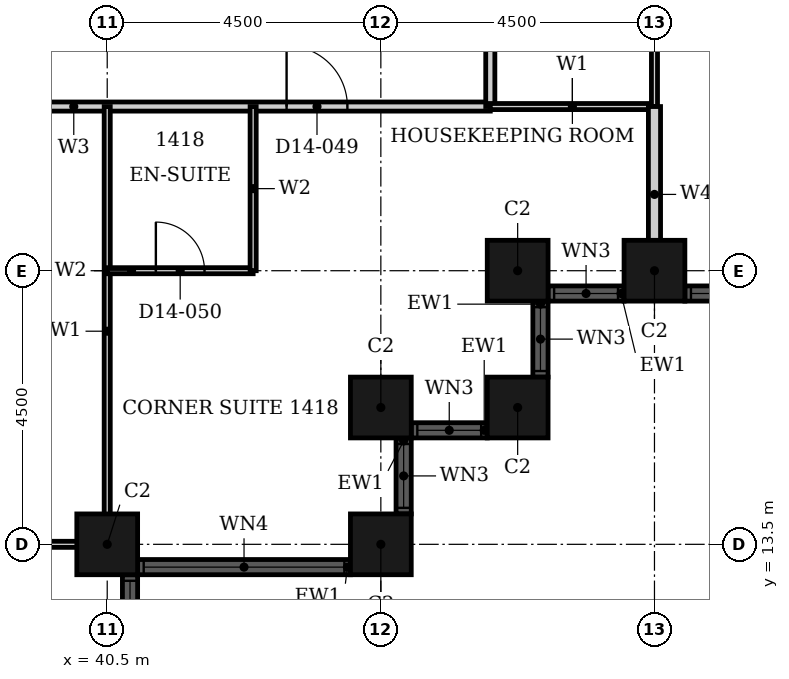
"""IFC4 building model, lengths in metres.
Left out: names, types, materials, properties, quantities, classifications, styles, units other than length and angle.
Written with IfcOpenShell. Run it as: python <this file> out.ifc"""

import sys

from ifc_helpers import new_model, si_unit, direction, frame, frame_2d, origin, origin_2d, place, context, subcontext, project, spatial, rectangle, hollow_rectangle, extrude, element, fill, save


model = new_model("IFC4")
c1 = context("Model", 3, precision=1e-05, world=origin(), true_north=direction((0.0, 1.0)))
c2 = subcontext(c1, "Body", "Model", "MODEL_VIEW")
j1 = project(units=[si_unit("LENGTHUNIT", "METRE"), si_unit("PLANEANGLEUNIT", "RADIAN")], contexts=[c1])
p1 = place(None, origin())
s1 = spatial("IfcSite", under=j1, at=p1, CompositionType="ELEMENT")
p2 = place(p1, origin())
s2 = spatial("IfcBuilding", under=s1, at=p2, CompositionType="ELEMENT")
p3 = place(p2, frame((0.0, 0.0, 63.6)))
s3 = spatial("IfcBuildingStorey", under=s2, at=p3, CompositionType="ELEMENT", Elevation=63.6)
for number, where, z_axis, x_axis in (
    (1, (40.5, 13.5, 0.0), (0.0, 0.0, 1.0), (1.0, 0.0, 0.0)),
    (2, (45.0, 13.5, 0.0), (0.0, 0.0, 1.0), (1.0, 0.0, 0.0)),
    (3, (45.0, 15.75, 0.0), (0.0, 0.0, 1.0), (1.0, 0.0, 0.0)),
    (4, (47.25, 15.75, 0.0), (0.0, 0.0, 1.0), (1.0, 0.0, 0.0)),
    (5, (47.25, 18.0, 0.0), (0.0, 0.0, 1.0), (1.0, 0.0, 0.0)),
    (6, (49.5, 18.0, 0.0), (0.0, 0.0, 1.0), (1.0, 0.0, 0.0)),
):
    element("IfcColumn", number, at=place(p3, frame(where, z_axis=z_axis, x_axis=x_axis)), inside=s3, PredefinedType="COLUMN", context=c2, shape_type="SweptSolid", body=[
        extrude(hollow_rectangle(XDim=1.0, YDim=1.0, WallThickness=0.032, at=origin_2d()), origin(), (0.0, 0.0, 1.0), 3.6),
    ])
p4 = place(p3, frame((40.875, 5.0, 0.0), z_axis=(0.0, 0.0, 1.0), x_axis=(0.0, 1.0, 0.0)))
e7 = element("IfcWall", 7, at=p4, inside=s3, PredefinedType="SOLIDWALL", context=c2, shape_type="SweptSolid", body=[
    extrude(rectangle(XDim=8.0, YDim=0.25, at=frame_2d((4.0, 0.0))), origin(), (0.0, 0.0, 1.0), 3.6),
])
p5 = place(p4, frame((0.1, 0.0, 0.9)))
e8 = element("IfcOpeningElement", 8, at=p5, cuts=e7, PredefinedType="OPENING", context=c2, shape_type="SweptSolid", body=[
    extrude(rectangle(XDim=3.3, YDim=2.08, at=frame_2d((1.65, 1.04))), frame((0.0, 0.135, 0.0), z_axis=(0.0, -1.0, 0.0), x_axis=(1.0, 0.0, 0.0)), (0.0, 0.0, 1.0), 0.27),
])
p6 = place(p4, frame((4.6, 0.0, 0.9)))
e9 = element("IfcOpeningElement", 9, at=p6, cuts=e7, PredefinedType="OPENING", context=c2, shape_type="SweptSolid", body=[
    extrude(rectangle(XDim=3.3, YDim=2.08, at=frame_2d((1.65, 1.04))), frame((0.0, 0.135, 0.0), z_axis=(0.0, -1.0, 0.0), x_axis=(1.0, 0.0, 0.0)), (0.0, 0.0, 1.0), 0.27),
])
p7 = place(p3, frame((41.0, 13.125, 0.0), z_axis=(0.0, 0.0, 1.0), x_axis=(1.0, 0.0, 0.0)))
e10 = element("IfcWall", 10, at=p7, inside=s3, PredefinedType="SOLIDWALL", context=c2, shape_type="SweptSolid", body=[
    extrude(rectangle(XDim=3.5, YDim=0.25, at=frame_2d((1.75, 0.0))), origin(), (0.0, 0.0, 1.0), 3.6),
])
p8 = place(p7, frame((0.1, 0.0, 0.9)))
e11 = element("IfcOpeningElement", 11, at=p8, cuts=e10, PredefinedType="OPENING", context=c2, shape_type="SweptSolid", body=[
    extrude(rectangle(XDim=3.3, YDim=2.08, at=frame_2d((1.65, 1.04))), frame((0.0, 0.135, 0.0), z_axis=(0.0, -1.0, 0.0), x_axis=(1.0, 0.0, 0.0)), (0.0, 0.0, 1.0), 0.27),
])
p9 = place(p3, frame((45.375, 14.0, 0.0), z_axis=(0.0, 0.0, 1.0), x_axis=(0.0, 1.0, 0.0)))
e12 = element("IfcWall", 12, at=p9, inside=s3, PredefinedType="SOLIDWALL", context=c2, shape_type="SweptSolid", body=[
    extrude(rectangle(XDim=1.25, YDim=0.25, at=frame_2d((0.625, 0.0))), origin(), (0.0, 0.0, 1.0), 3.6),
])
p10 = place(p9, frame((0.1, 0.0, 0.9)))
e13 = element("IfcOpeningElement", 13, at=p10, cuts=e12, PredefinedType="OPENING", context=c2, shape_type="SweptSolid", body=[
    extrude(rectangle(XDim=1.05, YDim=2.08, at=frame_2d((0.525, 1.04))), frame((0.0, 0.135, 0.0), z_axis=(0.0, -1.0, 0.0), x_axis=(1.0, 0.0, 0.0)), (0.0, 0.0, 1.0), 0.27),
])
p11 = place(p3, frame((45.5, 15.375, 0.0), z_axis=(0.0, 0.0, 1.0), x_axis=(1.0, 0.0, 0.0)))
e14 = element("IfcWall", 14, at=p11, inside=s3, PredefinedType="SOLIDWALL", context=c2, shape_type="SweptSolid", body=[
    extrude(rectangle(XDim=1.25, YDim=0.25, at=frame_2d((0.625, 0.0))), origin(), (0.0, 0.0, 1.0), 3.6),
])
p12 = place(p11, frame((0.1, 0.0, 0.9)))
e15 = element("IfcOpeningElement", 15, at=p12, cuts=e14, PredefinedType="OPENING", context=c2, shape_type="SweptSolid", body=[
    extrude(rectangle(XDim=1.05, YDim=2.08, at=frame_2d((0.525, 1.04))), frame((0.0, 0.135, 0.0), z_axis=(0.0, -1.0, 0.0), x_axis=(1.0, 0.0, 0.0)), (0.0, 0.0, 1.0), 0.27),
])
p13 = place(p3, frame((47.625, 16.25, 0.0), z_axis=(0.0, 0.0, 1.0), x_axis=(0.0, 1.0, 0.0)))
e16 = element("IfcWall", 16, at=p13, inside=s3, PredefinedType="SOLIDWALL", context=c2, shape_type="SweptSolid", body=[
    extrude(rectangle(XDim=1.25, YDim=0.25, at=frame_2d((0.625, 0.0))), origin(), (0.0, 0.0, 1.0), 3.6),
])
p14 = place(p13, frame((0.1, 0.0, 0.9)))
e17 = element("IfcOpeningElement", 17, at=p14, cuts=e16, PredefinedType="OPENING", context=c2, shape_type="SweptSolid", body=[
    extrude(rectangle(XDim=1.05, YDim=2.08, at=frame_2d((0.525, 1.04))), frame((0.0, 0.135, 0.0), z_axis=(0.0, -1.0, 0.0), x_axis=(1.0, 0.0, 0.0)), (0.0, 0.0, 1.0), 0.27),
])
p15 = place(p3, frame((47.75, 17.625, 0.0), z_axis=(0.0, 0.0, 1.0), x_axis=(1.0, 0.0, 0.0)))
e18 = element("IfcWall", 18, at=p15, inside=s3, PredefinedType="SOLIDWALL", context=c2, shape_type="SweptSolid", body=[
    extrude(rectangle(XDim=1.25, YDim=0.25, at=frame_2d((0.625, 0.0))), origin(), (0.0, 0.0, 1.0), 3.6),
])
p16 = place(p15, frame((0.1, 0.0, 0.9)))
e19 = element("IfcOpeningElement", 19, at=p16, cuts=e18, PredefinedType="OPENING", context=c2, shape_type="SweptSolid", body=[
    extrude(rectangle(XDim=1.05, YDim=2.08, at=frame_2d((0.525, 1.04))), frame((0.0, 0.135, 0.0), z_axis=(0.0, -1.0, 0.0), x_axis=(1.0, 0.0, 0.0)), (0.0, 0.0, 1.0), 0.27),
])
p17 = place(p3, frame((50.0, 17.625, 0.0), z_axis=(0.0, 0.0, 1.0), x_axis=(1.0, 0.0, 0.0)))
e20 = element("IfcWall", 20, at=p17, inside=s3, PredefinedType="SOLIDWALL", context=c2, shape_type="SweptSolid", body=[
    extrude(rectangle(XDim=8.0, YDim=0.25, at=frame_2d((4.0, 0.0))), origin(), (0.0, 0.0, 1.0), 3.6),
])
p18 = place(p17, frame((0.1, 0.0, 0.9)))
e21 = element("IfcOpeningElement", 21, at=p18, cuts=e20, PredefinedType="OPENING", context=c2, shape_type="SweptSolid", body=[
    extrude(rectangle(XDim=3.3, YDim=2.08, at=frame_2d((1.65, 1.04))), frame((0.0, 0.135, 0.0), z_axis=(0.0, -1.0, 0.0), x_axis=(1.0, 0.0, 0.0)), (0.0, 0.0, 1.0), 0.27),
])
p19 = place(p17, frame((4.6, 0.0, 0.9)))
e22 = element("IfcOpeningElement", 22, at=p19, cuts=e20, PredefinedType="OPENING", context=c2, shape_type="SweptSolid", body=[
    extrude(rectangle(XDim=3.3, YDim=2.08, at=frame_2d((1.65, 1.04))), frame((0.0, 0.135, 0.0), z_axis=(0.0, -1.0, 0.0), x_axis=(1.0, 0.0, 0.0)), (0.0, 0.0, 1.0), 0.27),
])
p20 = place(p3, frame((31.5, 20.7, 0.0), z_axis=(0.0, 0.0, 1.0), x_axis=(1.0, 0.0, 0.0)))
e23 = element("IfcWall", 23, at=p20, inside=s3, PredefinedType="PARTITIONING", context=c2, shape_type="SweptSolid", body=[
    extrude(rectangle(XDim=15.3, YDim=0.15, at=frame_2d((7.65, 0.0))), origin(), (0.0, 0.0, 1.0), 3.3),
])
p21 = place(p20, frame((11.95, 0.0, 0.0)))
e24 = element("IfcOpeningElement", 24, at=p21, cuts=e23, PredefinedType="OPENING", context=c2, shape_type="SweptSolid", body=[
    extrude(rectangle(XDim=1.0, YDim=2.1, at=frame_2d((0.5, 1.05))), frame((0.0, 0.085, 0.0), z_axis=(0.0, -1.0, 0.0), x_axis=(1.0, 0.0, 0.0)), (0.0, 0.0, 1.0), 0.17),
])
p22 = place(p20, frame((4.05, 0.0, 0.0)))
e25 = element("IfcOpeningElement", 25, at=p22, cuts=e23, PredefinedType="OPENING", context=c2, shape_type="SweptSolid", body=[
    extrude(rectangle(XDim=0.9, YDim=2.1, at=frame_2d((0.45, 1.05))), frame((0.0, 0.085, 0.0), z_axis=(0.0, -1.0, 0.0), x_axis=(1.0, 0.0, 0.0)), (0.0, 0.0, 1.0), 0.17),
])
p23 = place(p3, frame((46.8, 20.7, 0.0), z_axis=(0.0, 0.0, 1.0), x_axis=(0.0, 1.0, 0.0)))
e26 = element("IfcWall", 26, at=p23, inside=s3, PredefinedType="PARTITIONING", context=c2, shape_type="SweptSolid", body=[
    extrude(rectangle(XDim=6.3, YDim=0.15, at=frame_2d((3.15, 0.0))), origin(), (0.0, 0.0, 1.0), 3.3),
])
p24 = place(p23, frame((2.65, 0.0, 0.0)))
e27 = element("IfcOpeningElement", 27, at=p24, cuts=e26, PredefinedType="OPENING", context=c2, shape_type="SweptSolid", body=[
    extrude(rectangle(XDim=0.9, YDim=2.1, at=frame_2d((0.45, 1.05))), frame((0.0, 0.085, 0.0), z_axis=(0.0, -1.0, 0.0), x_axis=(1.0, 0.0, 0.0)), (0.0, 0.0, 1.0), 0.17),
])
p25 = place(p3, frame((31.5, 13.5, 0.0), z_axis=(0.0, 0.0, 1.0), x_axis=(1.0, 0.0, 0.0)))
e28 = element("IfcWall", 28, at=p25, inside=s3, PredefinedType="PARTITIONING", context=c2, shape_type="SweptSolid", body=[
    extrude(rectangle(XDim=9.19, YDim=0.1, at=frame_2d((4.595, 0.0))), origin(), (0.0, 0.0, 1.0), 2.38),
])
p26 = place(p3, frame((46.8, 20.7, 0.0), z_axis=(0.0, 0.0, 1.0), x_axis=(1.0, 0.0, 0.0)))
e29 = element("IfcWall", 29, at=p26, inside=s3, PredefinedType="PARTITIONING", context=c2, shape_type="SweptSolid", body=[
    extrude(rectangle(XDim=2.7, YDim=0.1, at=frame_2d((1.35, 0.0))), origin(), (0.0, 0.0, 1.0), 3.3),
])
p27 = place(p3, frame((40.5, 13.31, 0.0), z_axis=(0.0, 0.0, 1.0), x_axis=(0.0, 1.0, 0.0)))
e30 = element("IfcWall", 30, at=p27, inside=s3, PredefinedType="PARTITIONING", context=c2, shape_type="SweptSolid", body=[
    extrude(rectangle(XDim=7.39, YDim=0.1, at=frame_2d((3.695, 0.0))), origin(), (0.0, 0.0, 1.0), 3.3),
])
p28 = place(p3, frame((49.5, 20.7, 0.0), z_axis=(0.0, 0.0, 1.0), x_axis=(0.0, 1.0, 0.0)))
e31 = element("IfcWall", 31, at=p28, inside=s3, PredefinedType="PARTITIONING", context=c2, shape_type="SweptSolid", body=[
    extrude(rectangle(XDim=6.3, YDim=0.1, at=frame_2d((3.15, 0.0))), origin(), (0.0, 0.0, 1.0), 2.38),
])
p29 = place(p3, frame((49.5, 17.81, 0.0), z_axis=(0.0, 0.0, 1.0), x_axis=(0.0, 1.0, 0.0)))
e32 = element("IfcWall", 32, at=p29, inside=s3, PredefinedType="PARTITIONING", context=c2, shape_type="SweptSolid", body=[
    extrude(rectangle(XDim=2.89, YDim=0.2, at=frame_2d((1.445, 0.0))), origin(), (0.0, 0.0, 1.0), 2.38),
])
p30 = place(p3, frame((40.5, 18.0, 0.0), z_axis=(0.0, 0.0, 1.0), x_axis=(1.0, 0.0, 0.0)))
e33 = element("IfcWall", 33, at=p30, inside=s3, PredefinedType="PARTITIONING", context=c2, shape_type="SweptSolid", body=[
    extrude(rectangle(XDim=2.4, YDim=0.1, at=frame_2d((1.2, 0.0))), origin(), (0.0, 0.0, 1.0), 3.3),
])
p31 = place(p30, frame((0.8, 0.0, 0.0)))
e34 = element("IfcOpeningElement", 34, at=p31, cuts=e33, PredefinedType="OPENING", context=c2, shape_type="SweptSolid", body=[
    extrude(rectangle(XDim=0.8, YDim=2.1, at=frame_2d((0.4, 1.05))), frame((0.0, 0.06, 0.0), z_axis=(0.0, -1.0, 0.0), x_axis=(1.0, 0.0, 0.0)), (0.0, 0.0, 1.0), 0.12),
])
p32 = place(p3, frame((42.9, 18.0, 0.0), z_axis=(0.0, 0.0, 1.0), x_axis=(0.0, 1.0, 0.0)))
e35 = element("IfcWall", 35, at=p32, inside=s3, PredefinedType="PARTITIONING", context=c2, shape_type="SweptSolid", body=[
    extrude(rectangle(XDim=2.7, YDim=0.1, at=frame_2d((1.35, 0.0))), origin(), (0.0, 0.0, 1.0), 3.3),
])
p33 = place(p6, origin())
e36 = element("IfcWindow", 36, at=p33, inside=s3, PartitioningType="SINGLE_PANEL", PredefinedType="WINDOW", context=c2, shape_type="SweptSolid", body=[
    extrude(rectangle(XDim=3.3, YDim=2.08, at=frame_2d((1.65, 1.04))), frame((0.0, 0.03, 0.0), z_axis=(0.0, -1.0, 0.0), x_axis=(1.0, 0.0, 0.0)), (0.0, 0.0, 1.0), 0.06),
])
fill(e9, e36)
p34 = place(p8, origin())
e37 = element("IfcWindow", 37, at=p34, inside=s3, PartitioningType="SINGLE_PANEL", PredefinedType="WINDOW", context=c2, shape_type="SweptSolid", body=[
    extrude(rectangle(XDim=3.3, YDim=2.08, at=frame_2d((1.65, 1.04))), frame((0.0, 0.03, 0.0), z_axis=(0.0, -1.0, 0.0), x_axis=(1.0, 0.0, 0.0)), (0.0, 0.0, 1.0), 0.06),
])
fill(e11, e37)
p35 = place(p10, origin())
e38 = element("IfcWindow", 38, at=p35, inside=s3, PartitioningType="SINGLE_PANEL", PredefinedType="WINDOW", context=c2, shape_type="SweptSolid", body=[
    extrude(rectangle(XDim=1.05, YDim=2.08, at=frame_2d((0.525, 1.04))), frame((0.0, 0.03, 0.0), z_axis=(0.0, -1.0, 0.0), x_axis=(1.0, 0.0, 0.0)), (0.0, 0.0, 1.0), 0.06),
])
fill(e13, e38)
p36 = place(p12, origin())
e39 = element("IfcWindow", 39, at=p36, inside=s3, PartitioningType="SINGLE_PANEL", PredefinedType="WINDOW", context=c2, shape_type="SweptSolid", body=[
    extrude(rectangle(XDim=1.05, YDim=2.08, at=frame_2d((0.525, 1.04))), frame((0.0, 0.03, 0.0), z_axis=(0.0, -1.0, 0.0), x_axis=(1.0, 0.0, 0.0)), (0.0, 0.0, 1.0), 0.06),
])
fill(e15, e39)
p37 = place(p14, origin())
e40 = element("IfcWindow", 40, at=p37, inside=s3, PartitioningType="SINGLE_PANEL", PredefinedType="WINDOW", context=c2, shape_type="SweptSolid", body=[
    extrude(rectangle(XDim=1.05, YDim=2.08, at=frame_2d((0.525, 1.04))), frame((0.0, 0.03, 0.0), z_axis=(0.0, -1.0, 0.0), x_axis=(1.0, 0.0, 0.0)), (0.0, 0.0, 1.0), 0.06),
])
fill(e17, e40)
p38 = place(p16, origin())
e41 = element("IfcWindow", 41, at=p38, inside=s3, PartitioningType="SINGLE_PANEL", PredefinedType="WINDOW", context=c2, shape_type="SweptSolid", body=[
    extrude(rectangle(XDim=1.05, YDim=2.08, at=frame_2d((0.525, 1.04))), frame((0.0, 0.03, 0.0), z_axis=(0.0, -1.0, 0.0), x_axis=(1.0, 0.0, 0.0)), (0.0, 0.0, 1.0), 0.06),
])
fill(e19, e41)
p39 = place(p18, origin())
e42 = element("IfcWindow", 42, at=p39, inside=s3, PartitioningType="SINGLE_PANEL", PredefinedType="WINDOW", context=c2, shape_type="SweptSolid", body=[
    extrude(rectangle(XDim=3.3, YDim=2.08, at=frame_2d((1.65, 1.04))), frame((0.0, 0.03, 0.0), z_axis=(0.0, -1.0, 0.0), x_axis=(1.0, 0.0, 0.0)), (0.0, 0.0, 1.0), 0.06),
])
fill(e21, e42)
p40 = place(p21, origin())
e43 = element("IfcDoor", 43, at=p40, inside=s3, OperationType="SINGLE_SWING_RIGHT", PredefinedType="DOOR", context=c2, shape_type="SweptSolid", body=[
    extrude(rectangle(XDim=1.0, YDim=2.1, at=frame_2d((0.5, 1.05))), frame((0.0, 0.025, 0.0), z_axis=(0.0, -1.0, 0.0), x_axis=(1.0, 0.0, 0.0)), (0.0, 0.0, 1.0), 0.05),
])
fill(e24, e43)
p41 = place(p31, origin())
e44 = element("IfcDoor", 44, at=p41, inside=s3, OperationType="SINGLE_SWING_RIGHT", PredefinedType="DOOR", context=c2, shape_type="SweptSolid", body=[
    extrude(rectangle(XDim=0.8, YDim=2.1, at=frame_2d((0.4, 1.05))), frame((0.0, 0.025, 0.0), z_axis=(0.0, -1.0, 0.0), x_axis=(1.0, 0.0, 0.0)), (0.0, 0.0, 1.0), 0.05),
])
fill(e34, e44)
save(model, sys.argv[1])
